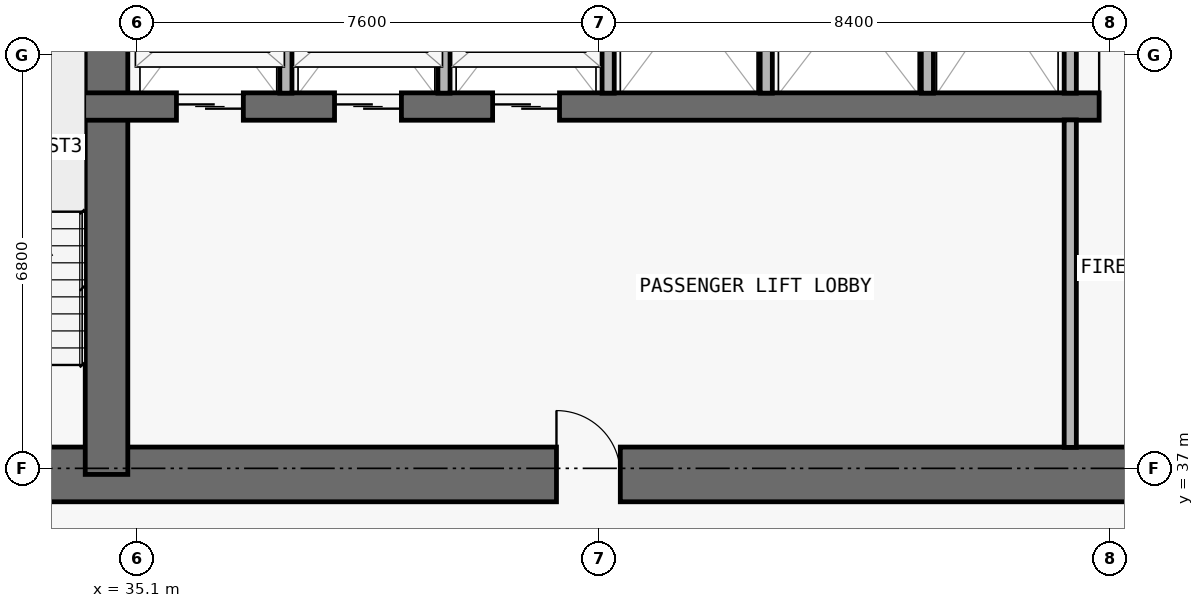
"""IFC4 building model, lengths in metres.
Left out: names, types, materials, properties, quantities, classifications, styles, units other than length and angle.
Written with IfcOpenShell. Run it as: python <this file> out.ifc"""

import sys

from ifc_helpers import new_model, si_unit, direction, frame, frame_2d, origin, place, context, subcontext, project, spatial, rectangle, extrude, element, fill, save


model = new_model("IFC4")
c1 = context("Model", 3, precision=1e-05, world=origin(), true_north=direction((0.0, 1.0)))
c2 = subcontext(c1, "Body", "Model", "MODEL_VIEW")
j1 = project(units=[si_unit("LENGTHUNIT", "METRE"), si_unit("PLANEANGLEUNIT", "RADIAN")], contexts=[c1])
p1 = place(None, origin())
s1 = spatial("IfcSite", under=j1, at=p1, CompositionType="ELEMENT")
p2 = place(p1, origin())
s2 = spatial("IfcBuilding", under=s1, at=p2, CompositionType="ELEMENT")
p3 = place(p2, frame((0.0, 0.0, 59.7)))
s3 = spatial("IfcBuildingStorey", under=s2, at=p3, CompositionType="ELEMENT", Elevation=59.7)
p4 = place(p3, frame((17.75, 36.9, 0.0), z_axis=(0.0, 0.0, 1.0), x_axis=(1.0, 0.0, 0.0)))
e1 = element("IfcWall", 1, at=p4, inside=s3, PredefinedType="SHEAR", context=c2, shape_type="SweptSolid", body=[
    extrude(rectangle(XDim=42.3, YDim=0.9, at=frame_2d((21.15, 0.0))), origin(), (0.0, 0.0, 1.0), 3.05),
])
p5 = place(p4, frame((14.55, 0.0, 0.0)))
e2 = element("IfcOpeningElement", 2, at=p5, cuts=e1, PredefinedType="OPENING", context=c2, shape_type="SweptSolid", body=[
    extrude(rectangle(XDim=1.1, YDim=2.15, at=frame_2d((0.55, 1.075))), frame((0.0, 0.46, 0.0), z_axis=(0.0, -1.0, 0.0), x_axis=(1.0, 0.0, 0.0)), (0.0, 0.0, 1.0), 0.92),
])
p6 = place(p4, frame((6.4, 0.0, 0.0)))
e3 = element("IfcOpeningElement", 3, at=p6, cuts=e1, PredefinedType="OPENING", context=c2, shape_type="SweptSolid", body=[
    extrude(rectangle(XDim=1.05, YDim=2.15, at=frame_2d((0.525, 1.075))), frame((0.0, 0.46, 0.0), z_axis=(0.0, -1.0, 0.0), x_axis=(1.0, 0.0, 0.0)), (0.0, 0.0, 1.0), 0.92),
])
p7 = place(p4, frame((34.9, 0.0, 0.0)))
e4 = element("IfcOpeningElement", 4, at=p7, cuts=e1, PredefinedType="OPENING", context=c2, shape_type="SweptSolid", body=[
    extrude(rectangle(XDim=1.05, YDim=2.15, at=frame_2d((0.525, 1.075))), frame((0.0, 0.46, 0.0), z_axis=(0.0, -1.0, 0.0), x_axis=(1.0, 0.0, 0.0)), (0.0, 0.0, 1.0), 0.92),
])
p8 = place(p4, frame((11.012, 0.0, 0.0)))
e5 = element("IfcOpeningElement", 5, at=p8, cuts=e1, PredefinedType="OPENING", context=c2, shape_type="SweptSolid", body=[
    extrude(rectangle(XDim=1.05, YDim=2.15, at=frame_2d((0.525, 1.075))), frame((0.0, 0.46, 0.0), z_axis=(0.0, -1.0, 0.0), x_axis=(1.0, 0.0, 0.0)), (0.0, 0.0, 1.0), 0.92),
])
p9 = place(p4, frame((24.25, 0.0, 0.0)))
e6 = element("IfcOpeningElement", 6, at=p9, cuts=e1, PredefinedType="OPENING", context=c2, shape_type="SweptSolid", body=[
    extrude(rectangle(XDim=1.05, YDim=2.15, at=frame_2d((0.525, 1.075))), frame((0.0, 0.46, 0.0), z_axis=(0.0, -1.0, 0.0), x_axis=(1.0, 0.0, 0.0)), (0.0, 0.0, 1.0), 0.92),
])
p10 = place(p3, frame((34.6, 36.9, 0.0), z_axis=(0.0, 0.0, 1.0), x_axis=(0.0, 1.0, 0.0)))
e7 = element("IfcWall", 7, at=p10, inside=s3, PredefinedType="SHEAR", context=c2, shape_type="SweptSolid", body=[
    extrude(rectangle(XDim=9.675, YDim=0.7, at=frame_2d((4.837, 0.0))), origin(), (0.0, 0.0, 1.0), 3.05),
])
p11 = place(p3, frame((22.25, 42.95, 0.0), z_axis=(0.0, 0.0, 1.0), x_axis=(1.0, 0.0, 0.0)))
e8 = element("IfcWall", 8, at=p11, inside=s3, PredefinedType="SHEAR", context=c2, shape_type="SweptSolid", body=[
    extrude(rectangle(XDim=33.3, YDim=0.45, at=frame_2d((16.65, 0.0))), origin(), (0.0, 0.0, 1.0), 3.05),
])
p12 = place(p11, frame((1.05, 0.0, 0.0)))
e9 = element("IfcOpeningElement", 9, at=p12, cuts=e8, PredefinedType="OPENING", context=c2, shape_type="SweptSolid", body=[
    extrude(rectangle(XDim=1.2, YDim=2.2, at=frame_2d((0.6, 1.1))), frame((0.0, 0.235, 0.0), z_axis=(0.0, -1.0, 0.0), x_axis=(1.0, 0.0, 0.0)), (0.0, 0.0, 1.0), 0.47),
])
p13 = place(p11, frame((31.05, 0.0, 0.0)))
e10 = element("IfcOpeningElement", 10, at=p13, cuts=e8, PredefinedType="OPENING", context=c2, shape_type="SweptSolid", body=[
    extrude(rectangle(XDim=1.2, YDim=2.2, at=frame_2d((0.6, 1.1))), frame((0.0, 0.235, 0.0), z_axis=(0.0, -1.0, 0.0), x_axis=(1.0, 0.0, 0.0)), (0.0, 0.0, 1.0), 0.47),
])
p14 = place(p11, frame((13.5, 0.0, 0.0)))
e11 = element("IfcOpeningElement", 11, at=p14, cuts=e8, PredefinedType="OPENING", context=c2, shape_type="SweptSolid", body=[
    extrude(rectangle(XDim=1.1, YDim=2.2, at=frame_2d((0.55, 1.1))), frame((0.0, 0.235, 0.0), z_axis=(0.0, -1.0, 0.0), x_axis=(1.0, 0.0, 0.0)), (0.0, 0.0, 1.0), 0.47),
])
p15 = place(p11, frame((16.1, 0.0, 0.0)))
e12 = element("IfcOpeningElement", 12, at=p15, cuts=e8, PredefinedType="OPENING", context=c2, shape_type="SweptSolid", body=[
    extrude(rectangle(XDim=1.1, YDim=2.2, at=frame_2d((0.55, 1.1))), frame((0.0, 0.235, 0.0), z_axis=(0.0, -1.0, 0.0), x_axis=(1.0, 0.0, 0.0)), (0.0, 0.0, 1.0), 0.47),
])
p16 = place(p11, frame((18.7, 0.0, 0.0)))
e13 = element("IfcOpeningElement", 13, at=p16, cuts=e8, PredefinedType="OPENING", context=c2, shape_type="SweptSolid", body=[
    extrude(rectangle(XDim=1.1, YDim=2.2, at=frame_2d((0.55, 1.1))), frame((0.0, 0.235, 0.0), z_axis=(0.0, -1.0, 0.0), x_axis=(1.0, 0.0, 0.0)), (0.0, 0.0, 1.0), 0.47),
])
p17 = place(p11, frame((3.625, 0.0, 0.0)))
e14 = element("IfcOpeningElement", 14, at=p17, cuts=e8, PredefinedType="OPENING", context=c2, shape_type="SweptSolid", body=[
    extrude(rectangle(XDim=1.05, YDim=2.15, at=frame_2d((0.525, 1.075))), frame((0.0, 0.235, 0.0), z_axis=(0.0, -1.0, 0.0), x_axis=(1.0, 0.0, 0.0)), (0.0, 0.0, 1.0), 0.47),
])
p18 = place(p11, frame((28.675, 0.0, 0.0)))
e15 = element("IfcOpeningElement", 15, at=p18, cuts=e8, PredefinedType="OPENING", context=c2, shape_type="SweptSolid", body=[
    extrude(rectangle(XDim=1.05, YDim=2.15, at=frame_2d((0.525, 1.075))), frame((0.0, 0.235, 0.0), z_axis=(0.0, -1.0, 0.0), x_axis=(1.0, 0.0, 0.0)), (0.0, 0.0, 1.0), 0.47),
])
for number, where, z_axis, x_axis in (
    (16, (37.55, 43.17, 0.0), (0.0, 0.0, 1.0), (0.0, 1.0, 0.0)),
    (17, (40.15, 43.17, 0.0), (0.0, 0.0, 1.0), (0.0, 1.0, 0.0)),
    (18, (42.85, 43.17, 0.0), (0.0, 0.0, 1.0), (0.0, 1.0, 0.0)),
    (19, (45.45, 43.17, 0.0), (0.0, 0.0, 1.0), (0.0, 1.0, 0.0)),
    (20, (48.1, 43.17, 0.0), (0.0, 0.0, 1.0), (0.0, 1.0, 0.0)),
):
    element("IfcWall", number, at=place(p3, frame(where, z_axis=z_axis, x_axis=x_axis)), inside=s3, PredefinedType="PARTITIONING", context=c2, shape_type="SweptSolid", body=[
        extrude(rectangle(XDim=3.185, YDim=0.2, at=frame_2d((1.593, 0.0))), origin(), (0.0, 0.0, 1.0), 3.05),
    ])
p19 = place(p3, frame((50.45, 37.345, 0.0), z_axis=(0.0, 0.0, 1.0), x_axis=(0.0, 1.0, 0.0)))
e21 = element("IfcWall", 21, at=p19, inside=s3, PredefinedType="PARTITIONING", context=c2, shape_type="SweptSolid", body=[
    extrude(rectangle(XDim=5.385, YDim=0.2, at=frame_2d((2.692, 0.0))), origin(), (0.0, 0.0, 1.0), 3.05),
])
p20 = place(p3, frame((50.45, 43.17, 0.0), z_axis=(0.0, 0.0, 1.0), x_axis=(0.0, 1.0, 0.0)))
e22 = element("IfcWall", 22, at=p20, inside=s3, PredefinedType="PARTITIONING", context=c2, shape_type="SweptSolid", body=[
    extrude(rectangle(XDim=3.185, YDim=0.2, at=frame_2d((1.593, 0.0))), origin(), (0.0, 0.0, 1.0), 3.05),
])
p21 = place(p14, origin())
e23 = element("IfcDoor", 23, at=p21, inside=s3, OperationType="DOUBLE_DOOR_SLIDING", PredefinedType="DOOR", context=c2, shape_type="SweptSolid", body=[
    extrude(rectangle(XDim=1.1, YDim=2.2, at=frame_2d((0.55, 1.1))), frame((0.0, 0.025, 0.0), z_axis=(0.0, -1.0, 0.0), x_axis=(1.0, 0.0, 0.0)), (0.0, 0.0, 1.0), 0.05),
])
fill(e11, e23)
p22 = place(p15, origin())
e24 = element("IfcDoor", 24, at=p22, inside=s3, OperationType="DOUBLE_DOOR_SLIDING", PredefinedType="DOOR", context=c2, shape_type="SweptSolid", body=[
    extrude(rectangle(XDim=1.1, YDim=2.2, at=frame_2d((0.55, 1.1))), frame((0.0, 0.025, 0.0), z_axis=(0.0, -1.0, 0.0), x_axis=(1.0, 0.0, 0.0)), (0.0, 0.0, 1.0), 0.05),
])
fill(e12, e24)
p23 = place(p16, origin())
e25 = element("IfcDoor", 25, at=p23, inside=s3, OperationType="DOUBLE_DOOR_SLIDING", PredefinedType="DOOR", context=c2, shape_type="SweptSolid", body=[
    extrude(rectangle(XDim=1.1, YDim=2.2, at=frame_2d((0.55, 1.1))), frame((0.0, 0.025, 0.0), z_axis=(0.0, -1.0, 0.0), x_axis=(1.0, 0.0, 0.0)), (0.0, 0.0, 1.0), 0.05),
])
fill(e13, e25)
p24 = place(p18, origin())
e26 = element("IfcDoor", 26, at=p24, inside=s3, OperationType="SINGLE_SWING_LEFT", PredefinedType="DOOR", context=c2, shape_type="SweptSolid", body=[
    extrude(rectangle(XDim=1.05, YDim=2.15, at=frame_2d((0.525, 1.075))), frame((0.0, 0.025, 0.0), z_axis=(0.0, -1.0, 0.0), x_axis=(1.0, 0.0, 0.0)), (0.0, 0.0, 1.0), 0.05),
])
fill(e15, e26)
p25 = place(p9, origin())
e27 = element("IfcDoor", 27, at=p25, inside=s3, OperationType="SINGLE_SWING_LEFT", PredefinedType="DOOR", context=c2, shape_type="SweptSolid", body=[
    extrude(rectangle(XDim=1.05, YDim=2.15, at=frame_2d((0.525, 1.075))), frame((0.0, 0.025, 0.0), z_axis=(0.0, -1.0, 0.0), x_axis=(1.0, 0.0, 0.0)), (0.0, 0.0, 1.0), 0.05),
])
fill(e6, e27)
save(model, sys.argv[1])
